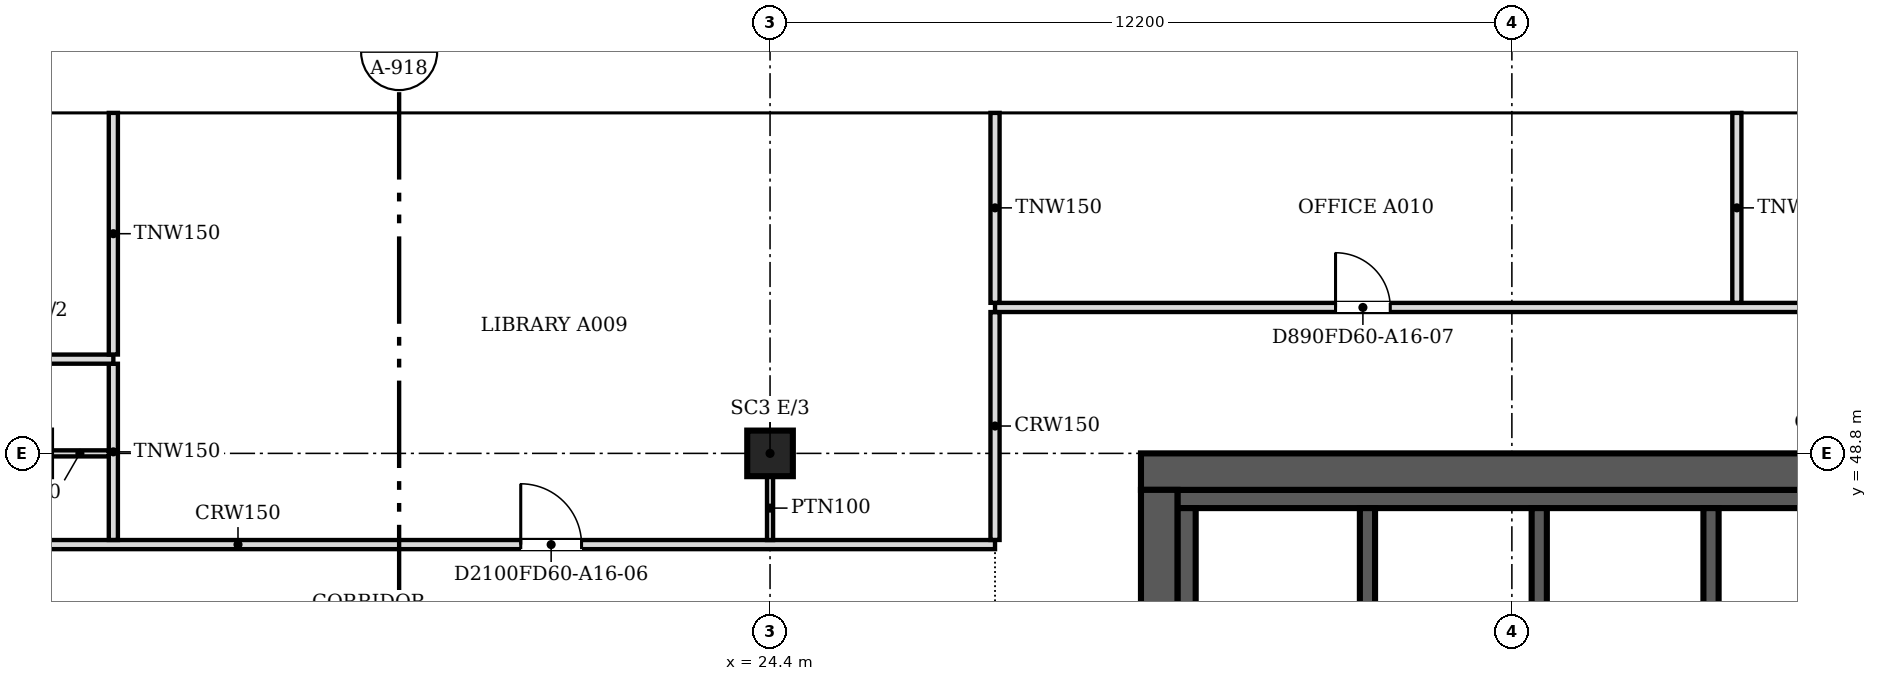
"""IFC4 building model, lengths in metres.
Left out: names, types, materials, properties, quantities, classifications, styles, units other than length and angle.
Written with IfcOpenShell. Run it as: python <this file> out.ifc"""

import sys

from ifc_helpers import new_model, si_unit, direction, frame, frame_2d, origin, origin_2d, place, context, subcontext, project, spatial, polyline, rectangle, outline, extrude, faceted_brep, source, transform, mapped, element, fill, save


model = new_model("IFC4")
c1 = context("Model", 3, precision=1e-05, world=origin(), true_north=direction((0.0, 1.0)))
c2 = subcontext(c1, "Body", "Model", "MODEL_VIEW")
j1 = project(units=[si_unit("LENGTHUNIT", "METRE"), si_unit("PLANEANGLEUNIT", "RADIAN")], contexts=[c1])
p1 = place(None, origin())
s1 = spatial("IfcSite", under=j1, at=p1, CompositionType="ELEMENT")
p2 = place(p1, origin())
s2 = spatial("IfcBuilding", under=s1, at=p2, CompositionType="ELEMENT")
p3 = place(p2, frame((0.0, 0.0, 178.2)))
s3 = spatial("IfcBuildingStorey", under=s2, at=p3, CompositionType="ELEMENT", Elevation=178.2)
p4 = place(p3, frame((24.4, 48.8, 0.0), z_axis=(0.0, 0.0, 1.0), x_axis=(1.0, 0.0, 0.0)))
e1 = element("IfcColumn", 1, at=p4, inside=s3, PredefinedType="COLUMN", context=c2, shape_type="SweptSolid", body=[
    extrude(rectangle(XDim=0.75, YDim=0.75, at=origin_2d()), origin(), (0.0, 0.0, 1.0), 3.6),
])
m1 = source(origin(), c2, "Body", "SweptSolid", [
    extrude(outline(polyline([(3.05, 0.0), (6.1, 3.8), (3.05, 7.6), (0.0, 3.8), (3.05, 0.0)])), frame((0.0, 0.25, 0.0), z_axis=(0.0, -1.0, 0.0), x_axis=(1.0, 0.0, 0.0)), (0.0, 0.0, 1.0), 0.5),
])
p5 = place(p3, frame((45.75, 54.65, -3.8), z_axis=(0.0, 0.0, 1.0), x_axis=(-1.0, 0.0, 0.0)))
e2 = element("IfcWall", 2, at=p5, inside=s3, PredefinedType="SOLIDWALL", context=c2, shape_type="MappedRepresentation", body=[
    mapped(m1, transform((0.0, 0.0, 0.0), scale=1.0)),
])
m2 = source(origin(), c2, "Body", "SweptSolid", [
    extrude(outline(polyline([(3.05, 0.399), (5.78, 3.8), (3.05, 7.201), (0.321, 3.8), (3.05, 0.399)])), frame((0.0, 0.26, 0.0), z_axis=(0.0, -1.0, 0.0), x_axis=(1.0, 0.0, 0.0)), (0.0, 0.0, 1.0), 0.52),
])
p6 = place(p5, origin())
e3 = element("IfcOpeningElement", 3, at=p6, cuts=e2, PredefinedType="OPENING", context=c2, shape_type="MappedRepresentation", body=[
    mapped(m2, transform((0.0, 0.0, 0.0), scale=1.0)),
])
m3 = source(origin(), c2, "Body", "Brep", [
    faceted_brep([(3.05, -0.25, 0.0), (6.1, -0.25, 3.8), (6.1, -0.25, 3.8), (3.05, -0.25, 7.6), (0.0, -0.25, 3.8), (0.0, 0.25, 3.8), (3.05, 0.25, 7.6), (6.1, 0.25, 3.8), (6.1, 0.25, 3.8), (3.05, 0.25, 0.0)], [[[0, 1, 2, 3, 4]], [[5, 6, 7, 8, 9]], [[9, 8, 1, 0]], [[7, 6, 3, 2]], [[6, 5, 4, 3]], [[5, 9, 0, 4]], [[1, 8, 7, 2]]]),
])
p7 = place(p3, frame((39.65, 54.65, -3.8), z_axis=(0.0, 0.0, 1.0), x_axis=(-1.0, 0.0, 0.0)))
e4 = element("IfcWall", 4, at=p7, inside=s3, PredefinedType="SOLIDWALL", context=c2, shape_type="MappedRepresentation", body=[
    mapped(m3, transform((0.0, 0.0, 0.0), scale=1.0)),
])
p8 = place(p7, origin())
e5 = element("IfcOpeningElement", 5, at=p8, cuts=e4, PredefinedType="OPENING", context=c2, shape_type="MappedRepresentation", body=[
    mapped(m2, transform((0.0, 0.0, 0.0), scale=1.0)),
])
p9 = place(p3, frame((33.55, 54.65, -3.8), z_axis=(0.0, 0.0, 1.0), x_axis=(-1.0, 0.0, 0.0)))
e6 = element("IfcWall", 6, at=p9, inside=s3, PredefinedType="SOLIDWALL", context=c2, shape_type="MappedRepresentation", body=[
    mapped(m1, transform((0.0, 0.0, 0.0), scale=1.0)),
])
p10 = place(p9, origin())
e7 = element("IfcOpeningElement", 7, at=p10, cuts=e6, PredefinedType="OPENING", context=c2, shape_type="MappedRepresentation", body=[
    mapped(m2, transform((0.0, 0.0, 0.0), scale=1.0)),
])
p11 = place(p3, frame((27.45, 54.65, -3.8), z_axis=(0.0, 0.0, 1.0), x_axis=(-1.0, 0.0, 0.0)))
e8 = element("IfcWall", 8, at=p11, inside=s3, PredefinedType="SOLIDWALL", context=c2, shape_type="MappedRepresentation", body=[
    mapped(m3, transform((0.0, 0.0, 0.0), scale=1.0)),
])
p12 = place(p11, origin())
e9 = element("IfcOpeningElement", 9, at=p12, cuts=e8, PredefinedType="OPENING", context=c2, shape_type="MappedRepresentation", body=[
    mapped(m2, transform((0.0, 0.0, 0.0), scale=1.0)),
])
p13 = place(p3, frame((21.35, 54.65, -3.8), z_axis=(0.0, 0.0, 1.0), x_axis=(-1.0, 0.0, 0.0)))
e10 = element("IfcWall", 10, at=p13, inside=s3, PredefinedType="SOLIDWALL", context=c2, shape_type="MappedRepresentation", body=[
    mapped(m1, transform((0.0, 0.0, 0.0), scale=1.0)),
])
p14 = place(p13, origin())
e11 = element("IfcOpeningElement", 11, at=p14, cuts=e10, PredefinedType="OPENING", context=c2, shape_type="MappedRepresentation", body=[
    mapped(m2, transform((0.0, 0.0, 0.0), scale=1.0)),
])
p15 = place(p3, frame((15.25, 54.65, -3.8), z_axis=(0.0, 0.0, 1.0), x_axis=(-1.0, 0.0, 0.0)))
e12 = element("IfcWall", 12, at=p15, inside=s3, PredefinedType="SOLIDWALL", context=c2, shape_type="MappedRepresentation", body=[
    mapped(m1, transform((0.0, 0.0, 0.0), scale=1.0)),
])
p16 = place(p15, origin())
e13 = element("IfcOpeningElement", 13, at=p16, cuts=e12, PredefinedType="OPENING", context=c2, shape_type="MappedRepresentation", body=[
    mapped(m2, transform((0.0, 0.0, 0.0), scale=1.0)),
])
p17 = place(p2, frame((0.0, 0.0, 182.0)))
s4 = spatial("IfcBuildingStorey", under=s2, at=p17, CompositionType="ELEMENT", Elevation=182.0)
p18 = place(p17, frame((42.7, 54.65, -3.8), z_axis=(0.0, 0.0, 1.0), x_axis=(-1.0, 0.0, 0.0)))
e14 = element("IfcWall", 14, at=p18, inside=s4, PredefinedType="SOLIDWALL", context=c2, shape_type="MappedRepresentation", body=[
    mapped(m3, transform((0.0, 0.0, 0.0), scale=1.0)),
])
p19 = place(p18, origin())
e15 = element("IfcOpeningElement", 15, at=p19, cuts=e14, PredefinedType="OPENING", context=c2, shape_type="MappedRepresentation", body=[
    mapped(m2, transform((0.0, 0.0, 0.0), scale=1.0)),
])
p20 = place(p17, frame((36.6, 54.65, -3.8), z_axis=(0.0, 0.0, 1.0), x_axis=(-1.0, 0.0, 0.0)))
e16 = element("IfcWall", 16, at=p20, inside=s4, PredefinedType="SOLIDWALL", context=c2, shape_type="MappedRepresentation", body=[
    mapped(m1, transform((0.0, 0.0, 0.0), scale=1.0)),
])
p21 = place(p20, origin())
e17 = element("IfcOpeningElement", 17, at=p21, cuts=e16, PredefinedType="OPENING", context=c2, shape_type="MappedRepresentation", body=[
    mapped(m2, transform((0.0, 0.0, 0.0), scale=1.0)),
])
p22 = place(p17, frame((30.5, 54.65, -3.8), z_axis=(0.0, 0.0, 1.0), x_axis=(-1.0, 0.0, 0.0)))
e18 = element("IfcWall", 18, at=p22, inside=s4, PredefinedType="SOLIDWALL", context=c2, shape_type="MappedRepresentation", body=[
    mapped(m1, transform((0.0, 0.0, 0.0), scale=1.0)),
])
p23 = place(p22, origin())
e19 = element("IfcOpeningElement", 19, at=p23, cuts=e18, PredefinedType="OPENING", context=c2, shape_type="MappedRepresentation", body=[
    mapped(m2, transform((0.0, 0.0, 0.0), scale=1.0)),
])
p24 = place(p17, frame((24.4, 54.65, -3.8), z_axis=(0.0, 0.0, 1.0), x_axis=(-1.0, 0.0, 0.0)))
e20 = element("IfcWall", 20, at=p24, inside=s4, PredefinedType="SOLIDWALL", context=c2, shape_type="MappedRepresentation", body=[
    mapped(m3, transform((0.0, 0.0, 0.0), scale=1.0)),
])
p25 = place(p24, origin())
e21 = element("IfcOpeningElement", 21, at=p25, cuts=e20, PredefinedType="OPENING", context=c2, shape_type="MappedRepresentation", body=[
    mapped(m2, transform((0.0, 0.0, 0.0), scale=1.0)),
])
p26 = place(p17, frame((18.3, 54.65, -3.8), z_axis=(0.0, 0.0, 1.0), x_axis=(-1.0, 0.0, 0.0)))
e22 = element("IfcWall", 22, at=p26, inside=s4, PredefinedType="SOLIDWALL", context=c2, shape_type="MappedRepresentation", body=[
    mapped(m1, transform((0.0, 0.0, 0.0), scale=1.0)),
])
p27 = place(p26, origin())
e23 = element("IfcOpeningElement", 23, at=p27, cuts=e22, PredefinedType="OPENING", context=c2, shape_type="MappedRepresentation", body=[
    mapped(m2, transform((0.0, 0.0, 0.0), scale=1.0)),
])
p28 = place(p3, frame((30.8, 25.0, 0.0), z_axis=(0.0, 0.0, 1.0), x_axis=(0.0, 1.0, 0.0)))
e24 = element("IfcWall", 24, at=p28, inside=s3, PredefinedType="SHEAR", context=c2, shape_type="SweptSolid", body=[
    extrude(rectangle(XDim=23.2, YDim=0.6, at=frame_2d((11.6, 0.0))), origin(), (0.0, 0.0, 1.0), 3.8),
])
m4 = source(origin(), c2, "Body", "SweptSolid", [
    extrude(rectangle(XDim=2.1, YDim=2.4, at=frame_2d((1.05, 1.2))), frame((0.0, 0.31, 0.0), z_axis=(0.0, -1.0, 0.0), x_axis=(1.0, 0.0, 0.0)), (0.0, 0.0, 1.0), 0.62),
])
p29 = place(p28, frame((4.8, 0.0, 0.0)))
e25 = element("IfcOpeningElement", 25, at=p29, cuts=e24, PredefinedType="OPENING", context=c2, shape_type="MappedRepresentation", body=[
    mapped(m4, transform((0.0, 0.0, 0.0), scale=1.0)),
])
p30 = place(p28, frame((16.3, 0.0, 0.0)))
e26 = element("IfcOpeningElement", 26, at=p30, cuts=e24, PredefinedType="OPENING", context=c2, shape_type="MappedRepresentation", body=[
    mapped(m4, transform((0.0, 0.0, 0.0), scale=1.0)),
])
p31 = place(p3, frame((30.5, 48.5, 0.0), z_axis=(0.0, 0.0, 1.0), x_axis=(1.0, 0.0, 0.0)))
e27 = element("IfcWall", 27, at=p31, inside=s3, PredefinedType="SHEAR", context=c2, shape_type="SweptSolid", body=[
    extrude(rectangle(XDim=24.4, YDim=0.6, at=frame_2d((12.2, 0.0))), origin(), (0.0, 0.0, 1.0), 3.8),
])
p32 = place(p3, frame((31.1, 48.05, 0.0), z_axis=(0.0, 0.0, 1.0), x_axis=(1.0, 0.0, 0.0)))
e28 = element("IfcWall", 28, at=p32, inside=s3, PredefinedType="SOLIDWALL", context=c2, shape_type="SweptSolid", body=[
    extrude(rectangle(XDim=23.2, YDim=0.3, at=frame_2d((11.6, 0.0))), origin(), (0.0, 0.0, 1.0), 3.8),
])
p33 = place(p3, frame((31.25, 43.4, 0.0), z_axis=(0.0, 0.0, 1.0), x_axis=(0.0, 1.0, 0.0)))
e29 = element("IfcWall", 29, at=p33, inside=s3, PredefinedType="SOLIDWALL", context=c2, shape_type="SweptSolid", body=[
    extrude(rectangle(XDim=4.5, YDim=0.3, at=frame_2d((2.25, 0.0))), origin(), (0.0, 0.0, 1.0), 3.8),
])
for number, where, z_axis, x_axis in (
    (30, (34.225, 45.025, 0.0), (0.0, 0.0, 1.0), (0.0, 1.0, 0.0)),
    (31, (37.05, 45.025, 0.0), (0.0, 0.0, 1.0), (0.0, 1.0, 0.0)),
    (32, (39.875, 45.025, 0.0), (0.0, 0.0, 1.0), (0.0, 1.0, 0.0)),
):
    element("IfcWall", number, at=place(p3, frame(where, z_axis=z_axis, x_axis=x_axis)), inside=s3, PredefinedType="SOLIDWALL", context=c2, shape_type="SweptSolid", body=[
        extrude(rectangle(XDim=2.875, YDim=0.25, at=frame_2d((1.438, 0.0))), origin(), (0.0, 0.0, 1.0), 3.8),
    ])
p34 = place(p3, frame((7.5, 47.3, 0.0), z_axis=(0.0, 0.0, 1.0), x_axis=(1.0, 0.0, 0.0)))
e33 = element("IfcWall", 33, at=p34, inside=s3, PredefinedType="PARTITIONING", context=c2, shape_type="SweptSolid", body=[
    extrude(rectangle(XDim=20.6, YDim=0.15, at=frame_2d((10.3, 0.0))), origin(), (0.0, 0.0, 1.0), 3.067),
])
m5 = source(origin(), c2, "Body", "SweptSolid", [
    extrude(rectangle(XDim=1.0, YDim=2.1, at=frame_2d((0.5, 1.05))), frame((0.0, 0.085, 0.0), z_axis=(0.0, -1.0, 0.0), x_axis=(1.0, 0.0, 0.0)), (0.0, 0.0, 1.0), 0.17),
])
p35 = place(p34, frame((2.5, 0.0, 0.0)))
e34 = element("IfcOpeningElement", 34, at=p35, cuts=e33, PredefinedType="OPENING", context=c2, shape_type="MappedRepresentation", body=[
    mapped(m5, transform((0.0, 0.0, 0.0), scale=1.0)),
])
p36 = place(p34, frame((12.8, 0.0, 0.0)))
e35 = element("IfcOpeningElement", 35, at=p36, cuts=e33, PredefinedType="OPENING", context=c2, shape_type="MappedRepresentation", body=[
    mapped(m5, transform((0.0, 0.0, 0.0), scale=1.0)),
])
p37 = place(p3, frame((13.6, 47.376, 0.0), z_axis=(0.0, 0.0, 1.0), x_axis=(0.0, 1.0, 0.0)))
e36 = element("IfcWall", 36, at=p37, inside=s3, PredefinedType="PARTITIONING", context=c2, shape_type="SweptSolid", body=[
    extrude(rectangle(XDim=2.898, YDim=0.15, at=frame_2d((1.449, 0.0))), origin(), (0.0, 0.0, 1.0), 3.067),
])
p38 = place(p3, frame((28.1, 47.376, 0.0), z_axis=(0.0, 0.0, 1.0), x_axis=(0.0, 1.0, 0.0)))
e37 = element("IfcWall", 37, at=p38, inside=s3, PredefinedType="PARTITIONING", context=c2, shape_type="SweptSolid", body=[
    extrude(rectangle(XDim=3.748, YDim=0.15, at=frame_2d((1.874, 0.0))), origin(), (0.0, 0.0, 1.0), 3.067),
])
p39 = place(p3, frame((24.4, 48.425, 0.0), z_axis=(0.0, 0.0, 1.0), x_axis=(0.0, -1.0, 0.0)))
e38 = element("IfcWall", 38, at=p39, inside=s3, PredefinedType="PARTITIONING", context=c2, shape_type="SweptSolid", body=[
    extrude(rectangle(XDim=1.05, YDim=0.1, at=frame_2d((0.525, 0.0))), origin(), (0.0, 0.0, 1.0), 3.067),
])
p40 = place(p3, frame((12.575, 48.8, 0.0), z_axis=(0.0, 0.0, 1.0), x_axis=(1.0, 0.0, 0.0)))
e39 = element("IfcWall", 39, at=p40, inside=s3, PredefinedType="PARTITIONING", context=c2, shape_type="SweptSolid", body=[
    extrude(rectangle(XDim=0.95, YDim=0.1, at=frame_2d((0.475, 0.0))), origin(), (0.0, 0.0, 1.0), 3.067),
])
p41 = place(p3, frame((7.5, 50.35, 0.0), z_axis=(0.0, 0.0, 1.0), x_axis=(1.0, 0.0, 0.0)))
e40 = element("IfcWall", 40, at=p41, inside=s3, PredefinedType="PARTITIONING", context=c2, shape_type="SweptSolid", body=[
    extrude(rectangle(XDim=6.1, YDim=0.15, at=frame_2d((3.05, 0.0))), origin(), (0.0, 0.0, 1.0), 3.067),
])
m6 = source(origin(), c2, "Body", "SweptSolid", [
    extrude(rectangle(XDim=0.9, YDim=2.1, at=frame_2d((0.45, 1.05))), frame((0.0, 0.085, 0.0), z_axis=(0.0, -1.0, 0.0), x_axis=(1.0, 0.0, 0.0)), (0.0, 0.0, 1.0), 0.17),
])
p42 = place(p41, frame((2.6, 0.0, 0.0)))
e41 = element("IfcOpeningElement", 41, at=p42, cuts=e40, PredefinedType="OPENING", context=c2, shape_type="MappedRepresentation", body=[
    mapped(m6, transform((0.0, 0.0, 0.0), scale=1.0)),
])
p43 = place(p3, frame((13.6, 50.426, 0.0), z_axis=(0.0, 0.0, 1.0), x_axis=(0.0, 1.0, 0.0)))
e42 = element("IfcWall", 42, at=p43, inside=s3, PredefinedType="PARTITIONING", context=c2, shape_type="SweptSolid", body=[
    extrude(rectangle(XDim=3.974, YDim=0.15, at=frame_2d((1.987, 0.0))), origin(), (0.0, 0.0, 1.0), 3.067),
])
p44 = place(p3, frame((28.1, 51.2, 0.0), z_axis=(0.0, 0.0, 1.0), x_axis=(1.0, 0.0, 0.0)))
e43 = element("IfcWall", 43, at=p44, inside=s3, PredefinedType="PARTITIONING", context=c2, shape_type="SweptSolid", body=[
    extrude(rectangle(XDim=31.438, YDim=0.15, at=frame_2d((15.719, 0.0))), origin(), (0.0, 0.0, 1.0), 3.067),
])
p45 = place(p44, frame((5.6, 0.0, 0.0)))
e44 = element("IfcOpeningElement", 44, at=p45, cuts=e43, PredefinedType="OPENING", context=c2, shape_type="MappedRepresentation", body=[
    mapped(m6, transform((0.0, 0.0, 0.0), scale=1.0)),
])
p46 = place(p44, frame((21.4, 0.0, 0.0)))
e45 = element("IfcOpeningElement", 45, at=p46, cuts=e43, PredefinedType="OPENING", context=c2, shape_type="MappedRepresentation", body=[
    mapped(m6, transform((0.0, 0.0, 0.0), scale=1.0)),
])
for number, where, z_axis, x_axis in (
    (46, (28.1, 51.276, 0.0), (0.0, 0.0, 1.0), (0.0, 1.0, 0.0)),
    (47, (40.3, 51.276, 0.0), (0.0, 0.0, 1.0), (0.0, 1.0, 0.0)),
):
    element("IfcWall", number, at=place(p3, frame(where, z_axis=z_axis, x_axis=x_axis)), inside=s3, PredefinedType="PARTITIONING", context=c2, shape_type="SweptSolid", body=[
        extrude(rectangle(XDim=3.124, YDim=0.15, at=frame_2d((1.562, 0.0))), origin(), (0.0, 0.0, 1.0), 3.067),
    ])
m7 = source(origin(), c2, "Body", "SweptSolid", [
    extrude(rectangle(XDim=0.9, YDim=2.1, at=frame_2d((0.45, 1.05))), frame((0.0, 0.025, 0.0), z_axis=(0.0, -1.0, 0.0), x_axis=(1.0, 0.0, 0.0)), (0.0, 0.0, 1.0), 0.05),
])
p47 = place(p45, origin())
e48 = element("IfcDoor", 48, at=p47, inside=s3, OperationType="SINGLE_SWING_LEFT", PredefinedType="DOOR", context=c2, shape_type="MappedRepresentation", body=[
    mapped(m7, transform((0.0, 0.0, 0.0), scale=1.0)),
])
fill(e44, e48)
m8 = source(origin(), c2, "Body", "SweptSolid", [
    extrude(rectangle(XDim=1.0, YDim=2.1, at=frame_2d((0.5, 1.05))), frame((0.0, 0.025, 0.0), z_axis=(0.0, -1.0, 0.0), x_axis=(1.0, 0.0, 0.0)), (0.0, 0.0, 1.0), 0.05),
])
p48 = place(p36, origin())
e49 = element("IfcDoor", 49, at=p48, inside=s3, OperationType="SINGLE_SWING_LEFT", PredefinedType="DOOR", context=c2, shape_type="MappedRepresentation", body=[
    mapped(m8, transform((0.0, 0.0, 0.0), scale=1.0)),
])
fill(e35, e49)
save(model, sys.argv[1])
